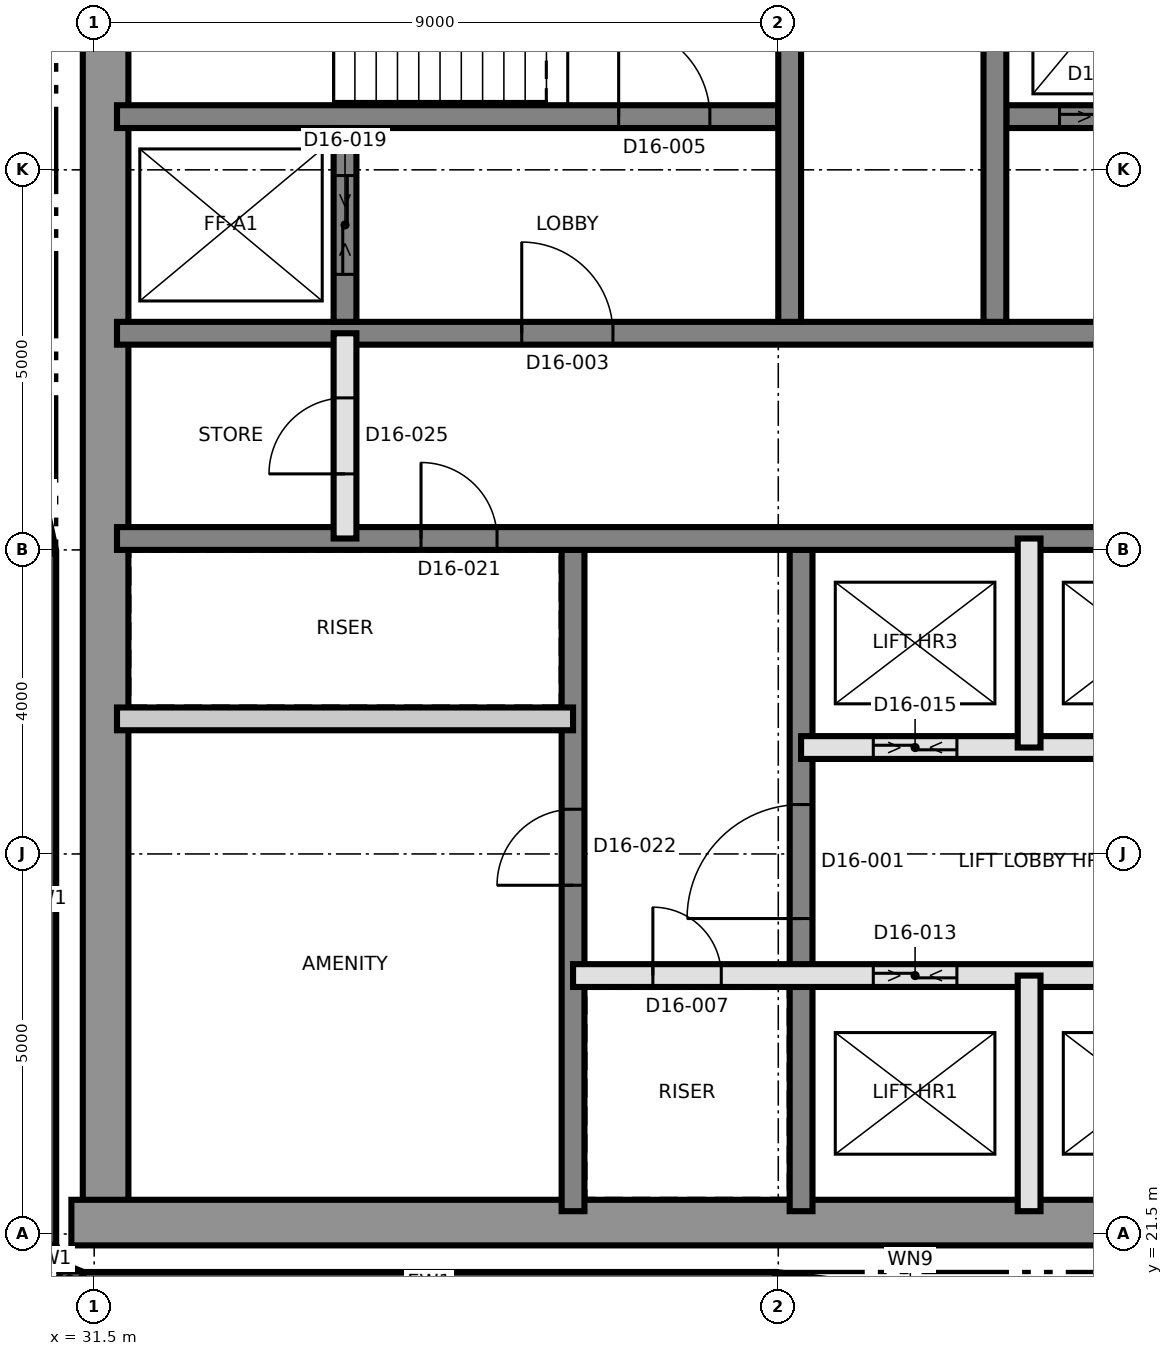
"""IFC4 building model, lengths in metres.
Left out: names, types, materials, properties, quantities, classifications, styles, units other than length and angle.
Written with IfcOpenShell. Run it as: python <this file> out.ifc"""

import sys

from ifc_helpers import new_model, si_unit, direction, frame, frame_2d, origin, place, context, subcontext, project, spatial, rectangle, extrude, element, fill, save


model = new_model("IFC4")
c1 = context("Model", 3, precision=1e-05, world=origin(), true_north=direction((0.0, 1.0)))
c2 = subcontext(c1, "Body", "Model", "MODEL_VIEW")
j1 = project(units=[si_unit("LENGTHUNIT", "METRE"), si_unit("PLANEANGLEUNIT", "RADIAN")], contexts=[c1])
p1 = place(None, origin())
s1 = spatial("IfcSite", under=j1, at=p1, CompositionType="ELEMENT")
p2 = place(p1, origin())
s2 = spatial("IfcBuilding", under=s1, at=p2, CompositionType="ELEMENT")
p3 = place(p2, frame((0.0, 0.0, 168.1)))
s3 = spatial("IfcBuildingStorey", under=s2, at=p3, CompositionType="ELEMENT", Elevation=168.1)
p4 = place(p3, frame((31.65, 21.8, 0.0), z_axis=(0.0, 0.0, 1.0), x_axis=(0.0, 1.0, 0.0)))
e1 = element("IfcWall", 1, at=p4, inside=s3, PredefinedType="SHEAR", context=c2, shape_type="SweptSolid", body=[
    extrude(rectangle(XDim=17.4, YDim=0.6, at=frame_2d((8.7, 0.0))), origin(), (0.0, 0.0, 1.0), 3.7),
])
p5 = place(p3, frame((31.2, 21.65, 0.0), z_axis=(0.0, 0.0, 1.0), x_axis=(1.0, 0.0, 0.0)))
e2 = element("IfcWall", 2, at=p5, inside=s3, PredefinedType="SHEAR", context=c2, shape_type="SweptSolid", body=[
    extrude(rectangle(XDim=27.0, YDim=0.6, at=frame_2d((13.5, 0.0))), origin(), (0.0, 0.0, 1.0), 3.7),
])
p6 = place(p3, frame((37.8, 21.8, 0.0), z_axis=(0.0, 0.0, 1.0), x_axis=(0.0, 1.0, 0.0)))
e3 = element("IfcWall", 3, at=p6, inside=s3, PredefinedType="SHEAR", context=c2, shape_type="SweptSolid", body=[
    extrude(rectangle(XDim=8.7, YDim=0.3, at=frame_2d((4.35, 0.0))), origin(), (0.0, 0.0, 1.0), 3.7),
])
p7 = place(p6, frame((4.288, 0.0, 0.0)))
e4 = element("IfcOpeningElement", 4, at=p7, cuts=e3, PredefinedType="OPENING", context=c2, shape_type="SweptSolid", body=[
    extrude(rectangle(XDim=1.0, YDim=2.1, at=frame_2d((0.5, 1.05))), frame((0.0, 0.16, 0.0), z_axis=(0.0, -1.0, 0.0), x_axis=(1.0, 0.0, 0.0)), (0.0, 0.0, 1.0), 0.32),
])
p8 = place(p3, frame((40.8, 21.8, 0.0), z_axis=(0.0, 0.0, 1.0), x_axis=(0.0, 1.0, 0.0)))
e5 = element("IfcWall", 5, at=p8, inside=s3, PredefinedType="SHEAR", context=c2, shape_type="SweptSolid", body=[
    extrude(rectangle(XDim=8.7, YDim=0.3, at=frame_2d((4.35, 0.0))), origin(), (0.0, 0.0, 1.0), 3.7),
])
p9 = place(p8, frame((3.85, 0.0, 0.0)))
e6 = element("IfcOpeningElement", 6, at=p9, cuts=e5, PredefinedType="OPENING", context=c2, shape_type="SweptSolid", body=[
    extrude(rectangle(XDim=1.5, YDim=2.1, at=frame_2d((0.75, 1.05))), frame((0.0, 0.16, 0.0), z_axis=(0.0, -1.0, 0.0), x_axis=(1.0, 0.0, 0.0)), (0.0, 0.0, 1.0), 0.32),
])
p10 = place(p3, frame((31.8, 30.65, 0.0), z_axis=(0.0, 0.0, 1.0), x_axis=(1.0, 0.0, 0.0)))
e7 = element("IfcWall", 7, at=p10, inside=s3, PredefinedType="SHEAR", context=c2, shape_type="SweptSolid", body=[
    extrude(rectangle(XDim=26.4, YDim=0.3, at=frame_2d((13.2, 0.0))), origin(), (0.0, 0.0, 1.0), 3.7),
])
p11 = place(p10, frame((24.7, 0.0, 0.0)))
e8 = element("IfcOpeningElement", 8, at=p11, cuts=e7, PredefinedType="OPENING", context=c2, shape_type="SweptSolid", body=[
    extrude(rectangle(XDim=1.0, YDim=2.1, at=frame_2d((0.5, 1.05))), frame((0.0, 0.16, 0.0), z_axis=(0.0, -1.0, 0.0), x_axis=(1.0, 0.0, 0.0)), (0.0, 0.0, 1.0), 0.32),
])
p12 = place(p10, frame((4.0, 0.0, 0.0)))
e9 = element("IfcOpeningElement", 9, at=p12, cuts=e7, PredefinedType="OPENING", context=c2, shape_type="SweptSolid", body=[
    extrude(rectangle(XDim=1.0, YDim=2.1, at=frame_2d((0.5, 1.05))), frame((0.0, 0.16, 0.0), z_axis=(0.0, -1.0, 0.0), x_axis=(1.0, 0.0, 0.0)), (0.0, 0.0, 1.0), 0.32),
])
p13 = place(p3, frame((31.8, 33.35, 0.0), z_axis=(0.0, 0.0, 1.0), x_axis=(1.0, 0.0, 0.0)))
e10 = element("IfcWall", 10, at=p13, inside=s3, PredefinedType="SHEAR", context=c2, shape_type="SweptSolid", body=[
    extrude(rectangle(XDim=26.4, YDim=0.3, at=frame_2d((13.2, 0.0))), origin(), (0.0, 0.0, 1.0), 3.7),
])
p14 = place(p13, frame((13.85, 0.0, 0.0)))
e11 = element("IfcOpeningElement", 11, at=p14, cuts=e10, PredefinedType="OPENING", context=c2, shape_type="SweptSolid", body=[
    extrude(rectangle(XDim=1.4, YDim=2.1, at=frame_2d((0.7, 1.05))), frame((0.0, 0.16, 0.0), z_axis=(0.0, -1.0, 0.0), x_axis=(1.0, 0.0, 0.0)), (0.0, 0.0, 1.0), 0.32),
])
p15 = place(p13, frame((5.325, 0.0, 0.0)))
e12 = element("IfcOpeningElement", 12, at=p15, cuts=e10, PredefinedType="OPENING", context=c2, shape_type="SweptSolid", body=[
    extrude(rectangle(XDim=1.2, YDim=2.1, at=frame_2d((0.6, 1.05))), frame((0.0, 0.16, 0.0), z_axis=(0.0, -1.0, 0.0), x_axis=(1.0, 0.0, 0.0)), (0.0, 0.0, 1.0), 0.32),
])
p16 = place(p13, frame((19.875, 0.0, 0.0)))
e13 = element("IfcOpeningElement", 13, at=p16, cuts=e10, PredefinedType="OPENING", context=c2, shape_type="SweptSolid", body=[
    extrude(rectangle(XDim=1.2, YDim=2.1, at=frame_2d((0.6, 1.05))), frame((0.0, 0.16, 0.0), z_axis=(0.0, -1.0, 0.0), x_axis=(1.0, 0.0, 0.0)), (0.0, 0.0, 1.0), 0.32),
])
p17 = place(p3, frame((31.8, 36.2, 0.0), z_axis=(0.0, 0.0, 1.0), x_axis=(1.0, 0.0, 0.0)))
e14 = element("IfcWall", 14, at=p17, inside=s3, PredefinedType="SHEAR", context=c2, shape_type="SweptSolid", body=[
    extrude(rectangle(XDim=8.7, YDim=0.3, at=frame_2d((4.35, 0.0))), origin(), (0.0, 0.0, 1.0), 3.7),
])
p18 = place(p17, frame((6.6, 0.0, 0.0)))
e15 = element("IfcOpeningElement", 15, at=p18, cuts=e14, PredefinedType="OPENING", context=c2, shape_type="SweptSolid", body=[
    extrude(rectangle(XDim=1.2, YDim=2.1, at=frame_2d((0.6, 1.05))), frame((0.0, 0.16, 0.0), z_axis=(0.0, -1.0, 0.0), x_axis=(1.0, 0.0, 0.0)), (0.0, 0.0, 1.0), 0.32),
])
p19 = place(p3, frame((43.5, 36.2, 0.0), z_axis=(0.0, 0.0, 1.0), x_axis=(1.0, 0.0, 0.0)))
e16 = element("IfcWall", 16, at=p19, inside=s3, PredefinedType="SHEAR", context=c2, shape_type="SweptSolid", body=[
    extrude(rectangle(XDim=14.7, YDim=0.3, at=frame_2d((7.35, 0.0))), origin(), (0.0, 0.0, 1.0), 3.7),
])
p20 = place(p19, frame((6.9, 0.0, 0.0)))
e17 = element("IfcOpeningElement", 17, at=p20, cuts=e16, PredefinedType="OPENING", context=c2, shape_type="SweptSolid", body=[
    extrude(rectangle(XDim=1.2, YDim=2.1, at=frame_2d((0.6, 1.05))), frame((0.0, 0.16, 0.0), z_axis=(0.0, -1.0, 0.0), x_axis=(1.0, 0.0, 0.0)), (0.0, 0.0, 1.0), 0.32),
])
p21 = place(p19, frame((0.7, 0.0, 0.0)))
e18 = element("IfcOpeningElement", 18, at=p21, cuts=e16, PredefinedType="OPENING", context=c2, shape_type="SweptSolid", body=[
    extrude(rectangle(XDim=1.3, YDim=2.4, at=frame_2d((0.65, 1.2))), frame((0.0, 0.16, 0.0), z_axis=(0.0, -1.0, 0.0), x_axis=(1.0, 0.0, 0.0)), (0.0, 0.0, 1.0), 0.32),
])
p22 = place(p19, frame((3.7, 0.0, 0.0)))
e19 = element("IfcOpeningElement", 19, at=p22, cuts=e16, PredefinedType="OPENING", context=c2, shape_type="SweptSolid", body=[
    extrude(rectangle(XDim=1.3, YDim=2.4, at=frame_2d((0.65, 1.2))), frame((0.0, 0.16, 0.0), z_axis=(0.0, -1.0, 0.0), x_axis=(1.0, 0.0, 0.0)), (0.0, 0.0, 1.0), 0.32),
])
for number, where, z_axis, x_axis in (
    (20, (40.65, 33.5, 0.0), (0.0, 0.0, 1.0), (0.0, 1.0, 0.0)),
    (21, (43.35, 33.5, 0.0), (0.0, 0.0, 1.0), (0.0, 1.0, 0.0)),
):
    element("IfcWall", number, at=place(p3, frame(where, z_axis=z_axis, x_axis=x_axis)), inside=s3, PredefinedType="SHEAR", context=c2, shape_type="SweptSolid", body=[
        extrude(rectangle(XDim=5.7, YDim=0.3, at=frame_2d((2.85, 0.0))), origin(), (0.0, 0.0, 1.0), 3.7),
    ])
p23 = place(p3, frame((34.8, 33.5, 0.0), z_axis=(0.0, 0.0, 1.0), x_axis=(0.0, 1.0, 0.0)))
e22 = element("IfcWall", 22, at=p23, inside=s3, PredefinedType="SHEAR", context=c2, shape_type="SweptSolid", body=[
    extrude(rectangle(XDim=2.55, YDim=0.3, at=frame_2d((1.275, 0.0))), origin(), (0.0, 0.0, 1.0), 3.7),
])
p24 = place(p23, frame((0.625, 0.0, 0.0)))
e23 = element("IfcOpeningElement", 23, at=p24, cuts=e22, PredefinedType="OPENING", context=c2, shape_type="SweptSolid", body=[
    extrude(rectangle(XDim=1.3, YDim=2.4, at=frame_2d((0.65, 1.2))), frame((0.0, 0.16, 0.0), z_axis=(0.0, -1.0, 0.0), x_axis=(1.0, 0.0, 0.0)), (0.0, 0.0, 1.0), 0.32),
])
p25 = place(p3, frame((30.85, 30.454, 0.0), z_axis=(0.0, 0.0, 1.0), x_axis=(0.0, -1.0, 0.0)))
e24 = element("IfcWall", 24, at=p25, inside=s3, PredefinedType="SOLIDWALL", context=c2, shape_type="SweptSolid", body=[
    extrude(rectangle(XDim=9.094, YDim=0.3, at=frame_2d((4.547, 0.0))), origin(), (0.0, 0.0, 1.0), 3.4),
])
for number, where, z_axis, x_axis in (
    (25, (30.861, 21.302, 0.0), (0.0, 0.0, 1.0), (0.383, -0.924, 0.0)),
    (26, (31.048, 20.967, 0.0), (0.0, 0.0, 1.0), (0.924, -0.383, 0.0)),
):
    element("IfcWall", number, at=place(p3, frame(where, z_axis=z_axis, x_axis=x_axis)), inside=s3, PredefinedType="SOLIDWALL", context=c2, shape_type="SweptSolid", body=[
        extrude(rectangle(XDim=0.275, YDim=0.3, at=frame_2d((0.138, 0.0))), origin(), (0.0, 0.0, 1.0), 3.4),
    ])
p26 = place(p3, frame((31.36, 20.85, 0.0), z_axis=(0.0, 0.0, 1.0), x_axis=(1.0, 0.0, 0.0)))
e27 = element("IfcWall", 27, at=p26, inside=s3, PredefinedType="SOLIDWALL", context=c2, shape_type="SweptSolid", body=[
    extrude(rectangle(XDim=9.094, YDim=0.3, at=frame_2d((4.547, 0.0))), origin(), (0.0, 0.0, 1.0), 3.4),
])
p27 = place(p3, frame((40.474, 20.849, 0.0), z_axis=(0.0, 0.0, 1.0), x_axis=(0.990778329255, -0.135492812649, 0.0)))
e28 = element("IfcWall", 28, at=p27, inside=s3, PredefinedType="SOLIDWALL", context=c2, shape_type="SweptSolid", body=[
    extrude(rectangle(XDim=3.559, YDim=0.3, at=frame_2d((1.779, 0.0))), origin(), (0.0, 0.0, 1.0), 3.4),
])
p28 = place(p27, frame((1.179, 0.0, 0.9)))
e29 = element("IfcOpeningElement", 29, at=p28, cuts=e28, PredefinedType="OPENING", context=c2, shape_type="SweptSolid", body=[
    extrude(rectangle(XDim=1.2, YDim=1.5, at=frame_2d((0.6, 0.75))), frame((0.0, 0.16, 0.0), z_axis=(0.0, -1.0, 0.0), x_axis=(1.0, 0.0, 0.0)), (0.0, 0.0, 1.0), 0.32),
])
p29 = place(p3, frame((30.506, 32.049, 0.0), z_axis=(0.0, 0.0, 1.0), x_axis=(0.212695686462, -0.977118490747, 0.0)))
e30 = element("IfcWall", 30, at=p29, inside=s3, PredefinedType="SOLIDWALL", context=c2, shape_type="SweptSolid", body=[
    extrude(rectangle(XDim=1.6, YDim=0.3, at=frame_2d((0.8, 0.0))), origin(), (0.0, 0.0, 1.0), 3.4),
])
p30 = place(p3, frame((37.8, 24.9, 0.0), z_axis=(0.0, 0.0, 1.0), x_axis=(1.0, 0.0, 0.0)))
e31 = element("IfcWall", 31, at=p30, inside=s3, PredefinedType="SOLIDWALL", context=c2, shape_type="SweptSolid", body=[
    extrude(rectangle(XDim=12.0, YDim=0.3, at=frame_2d((6.0, 0.0))), origin(), (0.0, 0.0, 1.0), 3.4),
])
p31 = place(p30, frame((1.05, 0.0, 0.0)))
e32 = element("IfcOpeningElement", 32, at=p31, cuts=e31, PredefinedType="OPENING", context=c2, shape_type="SweptSolid", body=[
    extrude(rectangle(XDim=0.9, YDim=2.1, at=frame_2d((0.45, 1.05))), frame((0.0, 0.16, 0.0), z_axis=(0.0, -1.0, 0.0), x_axis=(1.0, 0.0, 0.0)), (0.0, 0.0, 1.0), 0.32),
])
p32 = place(p30, frame((10.05, 0.0, 0.0)))
e33 = element("IfcOpeningElement", 33, at=p32, cuts=e31, PredefinedType="OPENING", context=c2, shape_type="SweptSolid", body=[
    extrude(rectangle(XDim=0.9, YDim=2.1, at=frame_2d((0.45, 1.05))), frame((0.0, 0.16, 0.0), z_axis=(0.0, -1.0, 0.0), x_axis=(1.0, 0.0, 0.0)), (0.0, 0.0, 1.0), 0.32),
])
p33 = place(p30, frame((3.95, 0.0, 0.0)))
e34 = element("IfcOpeningElement", 34, at=p33, cuts=e31, PredefinedType="OPENING", context=c2, shape_type="SweptSolid", body=[
    extrude(rectangle(XDim=1.1, YDim=2.4, at=frame_2d((0.55, 1.2))), frame((0.0, 0.16, 0.0), z_axis=(0.0, -1.0, 0.0), x_axis=(1.0, 0.0, 0.0)), (0.0, 0.0, 1.0), 0.32),
])
p34 = place(p30, frame((6.95, 0.0, 0.0)))
e35 = element("IfcOpeningElement", 35, at=p34, cuts=e31, PredefinedType="OPENING", context=c2, shape_type="SweptSolid", body=[
    extrude(rectangle(XDim=1.1, YDim=2.4, at=frame_2d((0.55, 1.2))), frame((0.0, 0.16, 0.0), z_axis=(0.0, -1.0, 0.0), x_axis=(1.0, 0.0, 0.0)), (0.0, 0.0, 1.0), 0.32),
])
p35 = place(p3, frame((40.8, 27.9, 0.0), z_axis=(0.0, 0.0, 1.0), x_axis=(1.0, 0.0, 0.0)))
e36 = element("IfcWall", 36, at=p35, inside=s3, PredefinedType="SOLIDWALL", context=c2, shape_type="SweptSolid", body=[
    extrude(rectangle(XDim=6.0, YDim=0.3, at=frame_2d((3.0, 0.0))), origin(), (0.0, 0.0, 1.0), 3.4),
])
p36 = place(p35, frame((0.95, 0.0, 0.0)))
e37 = element("IfcOpeningElement", 37, at=p36, cuts=e36, PredefinedType="OPENING", context=c2, shape_type="SweptSolid", body=[
    extrude(rectangle(XDim=1.1, YDim=2.4, at=frame_2d((0.55, 1.2))), frame((0.0, 0.16, 0.0), z_axis=(0.0, -1.0, 0.0), x_axis=(1.0, 0.0, 0.0)), (0.0, 0.0, 1.0), 0.32),
])
p37 = place(p35, frame((3.95, 0.0, 0.0)))
e38 = element("IfcOpeningElement", 38, at=p37, cuts=e36, PredefinedType="OPENING", context=c2, shape_type="SweptSolid", body=[
    extrude(rectangle(XDim=1.1, YDim=2.4, at=frame_2d((0.55, 1.2))), frame((0.0, 0.16, 0.0), z_axis=(0.0, -1.0, 0.0), x_axis=(1.0, 0.0, 0.0)), (0.0, 0.0, 1.0), 0.32),
])
p38 = place(p3, frame((31.8, 28.277, 0.0), z_axis=(0.0, 0.0, 1.0), x_axis=(1.0, 0.0, 0.0)))
e39 = element("IfcWall", 39, at=p38, inside=s3, PredefinedType="PARTITIONING", context=c2, shape_type="SweptSolid", body=[
    extrude(rectangle(XDim=6.0, YDim=0.3, at=frame_2d((3.0, 0.0))), origin(), (0.0, 0.0, 1.0), 3.4),
])
p39 = place(p3, frame((34.8, 30.65, 0.0), z_axis=(0.0, 0.0, 1.0), x_axis=(0.0, 1.0, 0.0)))
e40 = element("IfcWall", 40, at=p39, inside=s3, PredefinedType="SOLIDWALL", context=c2, shape_type="SweptSolid", body=[
    extrude(rectangle(XDim=2.7, YDim=0.3, at=frame_2d((1.35, 0.0))), origin(), (0.0, 0.0, 1.0), 3.4),
])
p40 = place(p39, frame((0.85, 0.0, 0.0)))
e41 = element("IfcOpeningElement", 41, at=p40, cuts=e40, PredefinedType="OPENING", context=c2, shape_type="SweptSolid", body=[
    extrude(rectangle(XDim=1.0, YDim=2.1, at=frame_2d((0.5, 1.05))), frame((0.0, 0.16, 0.0), z_axis=(0.0, -1.0, 0.0), x_axis=(1.0, 0.0, 0.0)), (0.0, 0.0, 1.0), 0.32),
])
p41 = place(p3, frame((43.8, 21.8, 0.0), z_axis=(0.0, 0.0, 1.0), x_axis=(0.0, 1.0, 0.0)))
e42 = element("IfcWall", 42, at=p41, inside=s3, PredefinedType="SOLIDWALL", context=c2, shape_type="SweptSolid", body=[
    extrude(rectangle(XDim=3.1, YDim=0.3, at=frame_2d((1.55, 0.0))), origin(), (0.0, 0.0, 1.0), 3.4),
])
p42 = place(p3, frame((43.8, 27.9, 0.0), z_axis=(0.0, 0.0, 1.0), x_axis=(0.0, 1.0, 0.0)))
e43 = element("IfcWall", 43, at=p42, inside=s3, PredefinedType="SOLIDWALL", context=c2, shape_type="SweptSolid", body=[
    extrude(rectangle(XDim=2.75, YDim=0.3, at=frame_2d((1.375, 0.0))), origin(), (0.0, 0.0, 1.0), 3.4),
])
p43 = place(p9, origin())
e44 = element("IfcDoor", 44, at=p43, inside=s3, OperationType="SINGLE_SWING_RIGHT", PredefinedType="DOOR", context=c2, shape_type="SweptSolid", body=[
    extrude(rectangle(XDim=1.5, YDim=2.1, at=frame_2d((0.75, 1.05))), frame((0.0, 0.025, 0.0), z_axis=(0.0, -1.0, 0.0), x_axis=(1.0, 0.0, 0.0)), (0.0, 0.0, 1.0), 0.05),
])
fill(e6, e44)
p44 = place(p15, origin())
e45 = element("IfcDoor", 45, at=p44, inside=s3, OperationType="SINGLE_SWING_LEFT", PredefinedType="DOOR", context=c2, shape_type="SweptSolid", body=[
    extrude(rectangle(XDim=1.2, YDim=2.1, at=frame_2d((0.6, 1.05))), frame((0.0, 0.025, 0.0), z_axis=(0.0, -1.0, 0.0), x_axis=(1.0, 0.0, 0.0)), (0.0, 0.0, 1.0), 0.05),
])
fill(e12, e45)
p45 = place(p18, origin())
e46 = element("IfcDoor", 46, at=p45, inside=s3, OperationType="SINGLE_SWING_RIGHT", PredefinedType="DOOR", context=c2, shape_type="SweptSolid", body=[
    extrude(rectangle(XDim=1.2, YDim=2.1, at=frame_2d((0.6, 1.05))), frame((0.0, 0.025, 0.0), z_axis=(0.0, -1.0, 0.0), x_axis=(1.0, 0.0, 0.0)), (0.0, 0.0, 1.0), 0.05),
])
fill(e15, e46)
p46 = place(p31, origin())
e47 = element("IfcDoor", 47, at=p46, inside=s3, OperationType="SINGLE_SWING_LEFT", PredefinedType="DOOR", context=c2, shape_type="SweptSolid", body=[
    extrude(rectangle(XDim=0.9, YDim=2.1, at=frame_2d((0.45, 1.05))), frame((0.0, 0.025, 0.0), z_axis=(0.0, -1.0, 0.0), x_axis=(1.0, 0.0, 0.0)), (0.0, 0.0, 1.0), 0.05),
])
fill(e32, e47)
p47 = place(p33, origin())
e48 = element("IfcDoor", 48, at=p47, inside=s3, OperationType="SLIDING_TO_LEFT", PredefinedType="DOOR", context=c2, shape_type="SweptSolid", body=[
    extrude(rectangle(XDim=1.1, YDim=2.4, at=frame_2d((0.55, 1.2))), frame((0.0, 0.025, 0.0), z_axis=(0.0, -1.0, 0.0), x_axis=(1.0, 0.0, 0.0)), (0.0, 0.0, 1.0), 0.05),
])
fill(e34, e48)
p48 = place(p36, origin())
e49 = element("IfcDoor", 49, at=p48, inside=s3, OperationType="SLIDING_TO_LEFT", PredefinedType="DOOR", context=c2, shape_type="SweptSolid", body=[
    extrude(rectangle(XDim=1.1, YDim=2.4, at=frame_2d((0.55, 1.2))), frame((0.0, 0.025, 0.0), z_axis=(0.0, -1.0, 0.0), x_axis=(1.0, 0.0, 0.0)), (0.0, 0.0, 1.0), 0.05),
])
fill(e37, e49)
p49 = place(p21, origin())
e50 = element("IfcDoor", 50, at=p49, inside=s3, OperationType="SLIDING_TO_LEFT", PredefinedType="DOOR", context=c2, shape_type="SweptSolid", body=[
    extrude(rectangle(XDim=1.3, YDim=2.4, at=frame_2d((0.65, 1.2))), frame((0.0, 0.025, 0.0), z_axis=(0.0, -1.0, 0.0), x_axis=(1.0, 0.0, 0.0)), (0.0, 0.0, 1.0), 0.05),
])
fill(e18, e50)
p50 = place(p24, origin())
e51 = element("IfcDoor", 51, at=p50, inside=s3, OperationType="SLIDING_TO_LEFT", PredefinedType="DOOR", context=c2, shape_type="SweptSolid", body=[
    extrude(rectangle(XDim=1.3, YDim=2.4, at=frame_2d((0.65, 1.2))), frame((0.0, 0.025, 0.0), z_axis=(0.0, -1.0, 0.0), x_axis=(1.0, 0.0, 0.0)), (0.0, 0.0, 1.0), 0.05),
])
fill(e23, e51)
p51 = place(p12, origin())
e52 = element("IfcDoor", 52, at=p51, inside=s3, OperationType="SINGLE_SWING_LEFT", PredefinedType="DOOR", context=c2, shape_type="SweptSolid", body=[
    extrude(rectangle(XDim=1.0, YDim=2.1, at=frame_2d((0.5, 1.05))), frame((0.0, 0.025, 0.0), z_axis=(0.0, -1.0, 0.0), x_axis=(1.0, 0.0, 0.0)), (0.0, 0.0, 1.0), 0.05),
])
fill(e9, e52)
p52 = place(p7, origin())
e53 = element("IfcDoor", 53, at=p52, inside=s3, OperationType="SINGLE_SWING_RIGHT", PredefinedType="DOOR", context=c2, shape_type="SweptSolid", body=[
    extrude(rectangle(XDim=1.0, YDim=2.1, at=frame_2d((0.5, 1.05))), frame((0.0, 0.025, 0.0), z_axis=(0.0, -1.0, 0.0), x_axis=(1.0, 0.0, 0.0)), (0.0, 0.0, 1.0), 0.05),
])
fill(e4, e53)
p53 = place(p40, origin())
e54 = element("IfcDoor", 54, at=p53, inside=s3, OperationType="SINGLE_SWING_LEFT", PredefinedType="DOOR", context=c2, shape_type="SweptSolid", body=[
    extrude(rectangle(XDim=1.0, YDim=2.1, at=frame_2d((0.5, 1.05))), frame((0.0, 0.025, 0.0), z_axis=(0.0, -1.0, 0.0), x_axis=(1.0, 0.0, 0.0)), (0.0, 0.0, 1.0), 0.05),
])
fill(e41, e54)
save(model, sys.argv[1])
